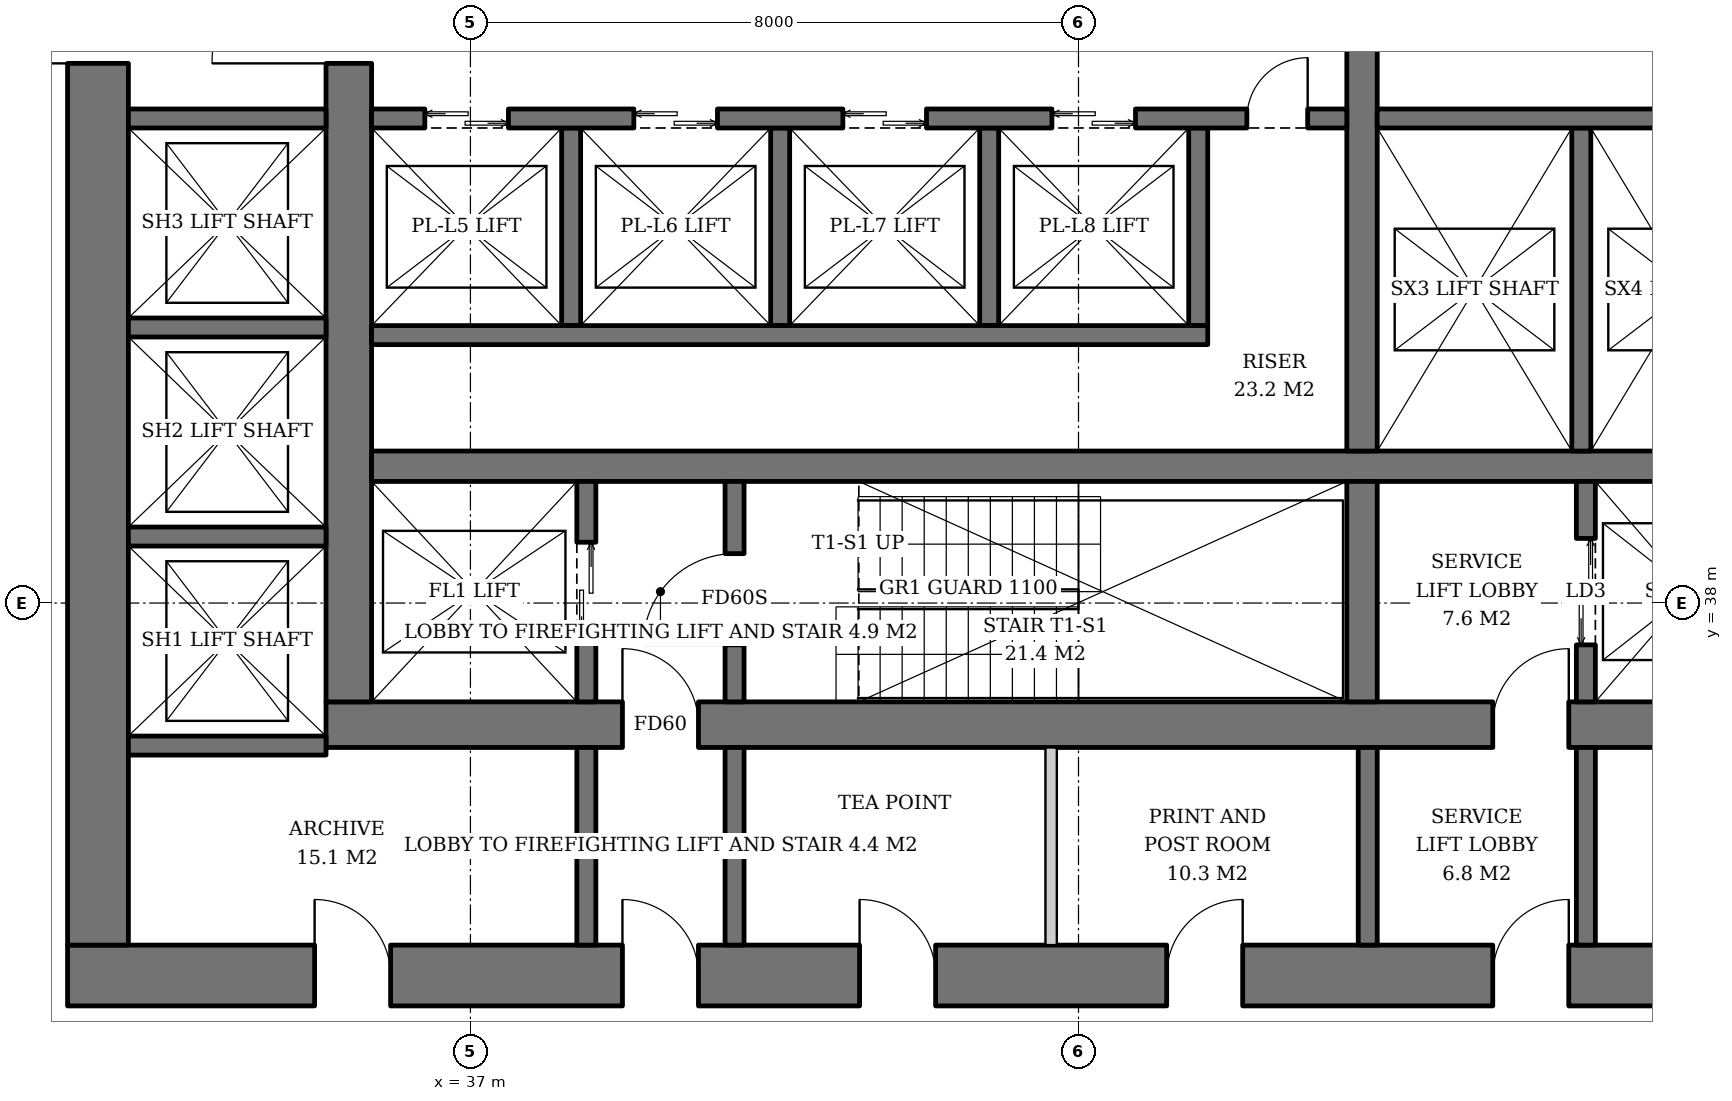
"""IFC4 building model, lengths in metres.
Left out: names, types, materials, properties, quantities, classifications, styles, units other than length and angle.
Written with IfcOpenShell. Run it as: python <this file> out.ifc"""

import sys

from ifc_helpers import new_model, si_unit, direction, frame, frame_2d, origin, place, context, subcontext, project, spatial, rectangle, extrude, element, fill, save


model = new_model("IFC4")
c1 = context("Model", 3, precision=1e-05, world=origin(), true_north=direction((0.0, 1.0)))
c2 = subcontext(c1, "Body", "Model", "MODEL_VIEW")
j1 = project(units=[si_unit("LENGTHUNIT", "METRE"), si_unit("PLANEANGLEUNIT", "RADIAN")], contexts=[c1])
p1 = place(None, origin())
s1 = spatial("IfcSite", under=j1, at=p1, CompositionType="ELEMENT")
p2 = place(p1, origin())
s2 = spatial("IfcBuilding", under=s1, at=p2, CompositionType="ELEMENT")
p3 = place(p2, frame((0.0, 0.0, 36.2)))
s3 = spatial("IfcBuildingStorey", under=s2, at=p3, CompositionType="ELEMENT", Elevation=36.2)
p4 = place(p3, frame((35.1, 36.4, 0.0), z_axis=(0.0, 0.0, 1.0), x_axis=(1.0, 0.0, 0.0)))
e1 = element("IfcWall", 1, at=p4, inside=s3, PredefinedType="SHEAR", context=c2, shape_type="SweptSolid", body=[
    extrude(rectangle(XDim=19.8, YDim=0.6, at=frame_2d((9.9, 0.0))), origin(), (0.0, 0.0, 1.0), 3.8),
])
p5 = place(p4, frame((3.9, 0.0, 0.0)))
e2 = element("IfcOpeningElement", 2, at=p5, cuts=e1, PredefinedType="OPENING", context=c2, shape_type="SweptSolid", body=[
    extrude(rectangle(XDim=1.0, YDim=2.1, at=frame_2d((0.5, 1.05))), frame((0.0, 0.31, 0.0), z_axis=(0.0, -1.0, 0.0), x_axis=(1.0, 0.0, 0.0)), (0.0, 0.0, 1.0), 0.62),
])
p6 = place(p4, frame((15.35, 0.0, 0.0)))
e3 = element("IfcOpeningElement", 3, at=p6, cuts=e1, PredefinedType="OPENING", context=c2, shape_type="SweptSolid", body=[
    extrude(rectangle(XDim=1.0, YDim=2.1, at=frame_2d((0.5, 1.05))), frame((0.0, 0.31, 0.0), z_axis=(0.0, -1.0, 0.0), x_axis=(1.0, 0.0, 0.0)), (0.0, 0.0, 1.0), 0.62),
])
p7 = place(p3, frame((35.4, 36.7, 0.0), z_axis=(0.0, 0.0, 1.0), x_axis=(0.0, 1.0, 0.0)))
e4 = element("IfcWall", 4, at=p7, inside=s3, PredefinedType="SHEAR", context=c2, shape_type="SweptSolid", body=[
    extrude(rectangle(XDim=18.6, YDim=0.6, at=frame_2d((9.3, 0.0))), origin(), (0.0, 0.0, 1.0), 3.8),
])
p8 = place(p7, frame((8.4, 0.0, 0.0)))
e5 = element("IfcOpeningElement", 5, at=p8, cuts=e4, PredefinedType="OPENING", context=c2, shape_type="SweptSolid", body=[
    extrude(rectangle(XDim=1.8, YDim=2.4, at=frame_2d((0.9, 1.2))), frame((0.0, 0.31, 0.0), z_axis=(0.0, -1.0, 0.0), x_axis=(1.0, 0.0, 0.0)), (0.0, 0.0, 1.0), 0.62),
])
p9 = place(p3, frame((31.7, 33.1, 0.0), z_axis=(0.0, 0.0, 1.0), x_axis=(1.0, 0.0, 0.0)))
e6 = element("IfcWall", 6, at=p9, inside=s3, PredefinedType="SHEAR", context=c2, shape_type="SweptSolid", body=[
    extrude(rectangle(XDim=26.6, YDim=0.8, at=frame_2d((13.3, 0.0))), origin(), (0.0, 0.0, 1.0), 3.8),
])
p10 = place(p9, frame((7.3, 0.0, 0.0)))
e7 = element("IfcOpeningElement", 7, at=p10, cuts=e6, PredefinedType="OPENING", context=c2, shape_type="SweptSolid", body=[
    extrude(rectangle(XDim=1.0, YDim=2.1, at=frame_2d((0.5, 1.05))), frame((0.0, 0.41, 0.0), z_axis=(0.0, -1.0, 0.0), x_axis=(1.0, 0.0, 0.0)), (0.0, 0.0, 1.0), 0.82),
])
p11 = place(p9, frame((18.75, 0.0, 0.0)))
e8 = element("IfcOpeningElement", 8, at=p11, cuts=e6, PredefinedType="OPENING", context=c2, shape_type="SweptSolid", body=[
    extrude(rectangle(XDim=1.0, YDim=2.1, at=frame_2d((0.5, 1.05))), frame((0.0, 0.41, 0.0), z_axis=(0.0, -1.0, 0.0), x_axis=(1.0, 0.0, 0.0)), (0.0, 0.0, 1.0), 0.82),
])
p12 = place(p9, frame((3.25, 0.0, 0.0)))
e9 = element("IfcOpeningElement", 9, at=p12, cuts=e6, PredefinedType="OPENING", context=c2, shape_type="SweptSolid", body=[
    extrude(rectangle(XDim=1.0, YDim=2.1, at=frame_2d((0.5, 1.05))), frame((0.0, 0.41, 0.0), z_axis=(0.0, -1.0, 0.0), x_axis=(1.0, 0.0, 0.0)), (0.0, 0.0, 1.0), 0.82),
])
p13 = place(p9, frame((10.42, 0.0, 0.0)))
e10 = element("IfcOpeningElement", 10, at=p13, cuts=e6, PredefinedType="OPENING", context=c2, shape_type="SweptSolid", body=[
    extrude(rectangle(XDim=1.0, YDim=2.1, at=frame_2d((0.5, 1.05))), frame((0.0, 0.41, 0.0), z_axis=(0.0, -1.0, 0.0), x_axis=(1.0, 0.0, 0.0)), (0.0, 0.0, 1.0), 0.82),
])
p14 = place(p9, frame((14.46, 0.0, 0.0)))
e11 = element("IfcOpeningElement", 11, at=p14, cuts=e6, PredefinedType="OPENING", context=c2, shape_type="SweptSolid", body=[
    extrude(rectangle(XDim=1.0, YDim=2.1, at=frame_2d((0.5, 1.05))), frame((0.0, 0.41, 0.0), z_axis=(0.0, -1.0, 0.0), x_axis=(1.0, 0.0, 0.0)), (0.0, 0.0, 1.0), 0.82),
])
p15 = place(p9, frame((22.45, 0.0, 0.0)))
e12 = element("IfcOpeningElement", 12, at=p15, cuts=e6, PredefinedType="OPENING", context=c2, shape_type="SweptSolid", body=[
    extrude(rectangle(XDim=1.0, YDim=2.1, at=frame_2d((0.5, 1.05))), frame((0.0, 0.41, 0.0), z_axis=(0.0, -1.0, 0.0), x_axis=(1.0, 0.0, 0.0)), (0.0, 0.0, 1.0), 0.82),
])
p16 = place(p3, frame((32.1, 33.5, 0.0), z_axis=(0.0, 0.0, 1.0), x_axis=(0.0, 1.0, 0.0)))
e13 = element("IfcWall", 13, at=p16, inside=s3, PredefinedType="SHEAR", context=c2, shape_type="SweptSolid", body=[
    extrude(rectangle(XDim=25.0, YDim=0.8, at=frame_2d((12.5, 0.0))), origin(), (0.0, 0.0, 1.0), 3.8),
])
p17 = place(p16, frame((11.6, 0.0, 0.0)))
e14 = element("IfcOpeningElement", 14, at=p17, cuts=e13, PredefinedType="OPENING", context=c2, shape_type="SweptSolid", body=[
    extrude(rectangle(XDim=1.8, YDim=2.4, at=frame_2d((0.9, 1.2))), frame((0.0, 0.41, 0.0), z_axis=(0.0, -1.0, 0.0), x_axis=(1.0, 0.0, 0.0)), (0.0, 0.0, 1.0), 0.82),
])
p18 = place(p3, frame((35.7, 39.8, 0.0), z_axis=(0.0, 0.0, 1.0), x_axis=(1.0, 0.0, 0.0)))
e15 = element("IfcWall", 15, at=p18, inside=s3, PredefinedType="SHEAR", context=c2, shape_type="SweptSolid", body=[
    extrude(rectangle(XDim=18.6, YDim=0.4, at=frame_2d((9.3, 0.0))), origin(), (0.0, 0.0, 1.0), 3.8),
])
p19 = place(p3, frame((48.73, 36.7, 0.0), z_axis=(0.0, 0.0, 1.0), x_axis=(0.0, 1.0, 0.0)))
e16 = element("IfcWall", 16, at=p19, inside=s3, PredefinedType="SHEAR", context=c2, shape_type="SweptSolid", body=[
    extrude(rectangle(XDim=2.9, YDim=0.4, at=frame_2d((1.45, 0.0))), origin(), (0.0, 0.0, 1.0), 3.8),
])
p20 = place(p3, frame((48.73, 40.0, 0.0), z_axis=(0.0, 0.0, 1.0), x_axis=(0.0, 1.0, 0.0)))
e17 = element("IfcWall", 17, at=p20, inside=s3, PredefinedType="SHEAR", context=c2, shape_type="SweptSolid", body=[
    extrude(rectangle(XDim=12.0, YDim=0.4, at=frame_2d((6.0, 0.0))), origin(), (0.0, 0.0, 1.0), 3.8),
])
p21 = place(p3, frame((38.525, 36.7, 0.0), z_axis=(0.0, 0.0, 1.0), x_axis=(0.0, 1.0, 0.0)))
e18 = element("IfcWall", 18, at=p21, inside=s3, PredefinedType="SHEAR", context=c2, shape_type="SweptSolid", body=[
    extrude(rectangle(XDim=2.9, YDim=0.25, at=frame_2d((1.45, 0.0))), origin(), (0.0, 0.0, 1.0), 3.8),
])
p22 = place(p21, frame((0.8, 0.0, 0.0)))
e19 = element("IfcOpeningElement", 19, at=p22, cuts=e18, PredefinedType="OPENING", context=c2, shape_type="SweptSolid", body=[
    extrude(rectangle(XDim=1.3, YDim=2.2, at=frame_2d((0.65, 1.1))), frame((0.0, 0.135, 0.0), z_axis=(0.0, -1.0, 0.0), x_axis=(1.0, 0.0, 0.0)), (0.0, 0.0, 1.0), 0.27),
])
p23 = place(p3, frame((40.475, 36.7, 0.0), z_axis=(0.0, 0.0, 1.0), x_axis=(0.0, 1.0, 0.0)))
e20 = element("IfcWall", 20, at=p23, inside=s3, PredefinedType="SHEAR", context=c2, shape_type="SweptSolid", body=[
    extrude(rectangle(XDim=2.9, YDim=0.25, at=frame_2d((1.45, 0.0))), origin(), (0.0, 0.0, 1.0), 3.8),
])
p24 = place(p23, frame((0.75, 0.0, 0.0)))
e21 = element("IfcOpeningElement", 21, at=p24, cuts=e20, PredefinedType="OPENING", context=c2, shape_type="SweptSolid", body=[
    extrude(rectangle(XDim=1.2, YDim=2.1, at=frame_2d((0.6, 1.05))), frame((0.0, 0.135, 0.0), z_axis=(0.0, -1.0, 0.0), x_axis=(1.0, 0.0, 0.0)), (0.0, 0.0, 1.0), 0.27),
])
p25 = place(p3, frame((51.675, 36.7, 0.0), z_axis=(0.0, 0.0, 1.0), x_axis=(0.0, 1.0, 0.0)))
e22 = element("IfcWall", 22, at=p25, inside=s3, PredefinedType="SHEAR", context=c2, shape_type="SweptSolid", body=[
    extrude(rectangle(XDim=2.9, YDim=0.25, at=frame_2d((1.45, 0.0))), origin(), (0.0, 0.0, 1.0), 3.8),
])
p26 = place(p25, frame((0.75, 0.0, 0.0)))
e23 = element("IfcOpeningElement", 23, at=p26, cuts=e22, PredefinedType="OPENING", context=c2, shape_type="SweptSolid", body=[
    extrude(rectangle(XDim=1.4, YDim=2.4, at=frame_2d((0.7, 1.2))), frame((0.0, 0.135, 0.0), z_axis=(0.0, -1.0, 0.0), x_axis=(1.0, 0.0, 0.0)), (0.0, 0.0, 1.0), 0.27),
])
for number, where, z_axis, x_axis in (
    (24, (38.325, 44.25, 0.0), (0.0, 0.0, 1.0), (0.0, -1.0, 0.0)),
    (25, (41.075, 44.25, 0.0), (0.0, 0.0, 1.0), (0.0, -1.0, 0.0)),
    (26, (43.825, 44.25, 0.0), (0.0, 0.0, 1.0), (0.0, -1.0, 0.0)),
    (27, (46.575, 44.25, 0.0), (0.0, 0.0, 1.0), (0.0, -1.0, 0.0)),
):
    element("IfcWall", number, at=place(p3, frame(where, z_axis=z_axis, x_axis=x_axis)), inside=s3, PredefinedType="SHEAR", context=c2, shape_type="SweptSolid", body=[
        extrude(rectangle(XDim=2.6, YDim=0.25, at=frame_2d((1.3, 0.0))), origin(), (0.0, 0.0, 1.0), 3.8),
    ])
p27 = place(p3, frame((35.7, 41.525, 0.0), z_axis=(0.0, 0.0, 1.0), x_axis=(1.0, 0.0, 0.0)))
e28 = element("IfcWall", 28, at=p27, inside=s3, PredefinedType="SHEAR", context=c2, shape_type="SweptSolid", body=[
    extrude(rectangle(XDim=11.0, YDim=0.25, at=frame_2d((5.5, 0.0))), origin(), (0.0, 0.0, 1.0), 3.8),
])
p28 = place(p3, frame((35.7, 44.375, 0.0), z_axis=(0.0, 0.0, 1.0), x_axis=(1.0, 0.0, 0.0)))
e29 = element("IfcWall", 29, at=p28, inside=s3, PredefinedType="SHEAR", context=c2, shape_type="SweptSolid", body=[
    extrude(rectangle(XDim=12.83, YDim=0.25, at=frame_2d((6.415, 0.0))), origin(), (0.0, 0.0, 1.0), 3.8),
])
p29 = place(p28, frame((0.7, 0.0, 0.0)))
e30 = element("IfcOpeningElement", 30, at=p29, cuts=e29, PredefinedType="OPENING", context=c2, shape_type="SweptSolid", body=[
    extrude(rectangle(XDim=1.1, YDim=2.2, at=frame_2d((0.55, 1.1))), frame((0.0, 0.135, 0.0), z_axis=(0.0, -1.0, 0.0), x_axis=(1.0, 0.0, 0.0)), (0.0, 0.0, 1.0), 0.27),
])
p30 = place(p28, frame((3.45, 0.0, 0.0)))
e31 = element("IfcOpeningElement", 31, at=p30, cuts=e29, PredefinedType="OPENING", context=c2, shape_type="SweptSolid", body=[
    extrude(rectangle(XDim=1.1, YDim=2.2, at=frame_2d((0.55, 1.1))), frame((0.0, 0.135, 0.0), z_axis=(0.0, -1.0, 0.0), x_axis=(1.0, 0.0, 0.0)), (0.0, 0.0, 1.0), 0.27),
])
p31 = place(p28, frame((6.2, 0.0, 0.0)))
e32 = element("IfcOpeningElement", 32, at=p31, cuts=e29, PredefinedType="OPENING", context=c2, shape_type="SweptSolid", body=[
    extrude(rectangle(XDim=1.1, YDim=2.2, at=frame_2d((0.55, 1.1))), frame((0.0, 0.135, 0.0), z_axis=(0.0, -1.0, 0.0), x_axis=(1.0, 0.0, 0.0)), (0.0, 0.0, 1.0), 0.27),
])
p32 = place(p28, frame((8.95, 0.0, 0.0)))
e33 = element("IfcOpeningElement", 33, at=p32, cuts=e29, PredefinedType="OPENING", context=c2, shape_type="SweptSolid", body=[
    extrude(rectangle(XDim=1.1, YDim=2.2, at=frame_2d((0.55, 1.1))), frame((0.0, 0.135, 0.0), z_axis=(0.0, -1.0, 0.0), x_axis=(1.0, 0.0, 0.0)), (0.0, 0.0, 1.0), 0.27),
])
p33 = place(p28, frame((11.515, 0.0, 0.0)))
e34 = element("IfcOpeningElement", 34, at=p33, cuts=e29, PredefinedType="OPENING", context=c2, shape_type="SweptSolid", body=[
    extrude(rectangle(XDim=0.8, YDim=2.0, at=frame_2d((0.4, 1.0))), frame((0.0, 0.135, 0.0), z_axis=(0.0, -1.0, 0.0), x_axis=(1.0, 0.0, 0.0)), (0.0, 0.0, 1.0), 0.27),
])
p34 = place(p3, frame((51.615, 44.25, 0.0), z_axis=(0.0, 0.0, 1.0), x_axis=(0.0, -1.0, 0.0)))
e35 = element("IfcWall", 35, at=p34, inside=s3, PredefinedType="SHEAR", context=c2, shape_type="SweptSolid", body=[
    extrude(rectangle(XDim=4.25, YDim=0.25, at=frame_2d((2.125, 0.0))), origin(), (0.0, 0.0, 1.0), 3.8),
])
p35 = place(p3, frame((48.93, 44.375, 0.0), z_axis=(0.0, 0.0, 1.0), x_axis=(1.0, 0.0, 0.0)))
e36 = element("IfcWall", 36, at=p35, inside=s3, PredefinedType="SHEAR", context=c2, shape_type="SweptSolid", body=[
    extrude(rectangle(XDim=5.37, YDim=0.25, at=frame_2d((2.685, 0.0))), origin(), (0.0, 0.0, 1.0), 3.8),
])
for number, where, z_axis, x_axis in (
    (37, (32.5, 36.125, 0.0), (0.0, 0.0, 1.0), (1.0, 0.0, 0.0)),
    (38, (32.5, 38.875, 0.0), (0.0, 0.0, 1.0), (1.0, 0.0, 0.0)),
    (39, (32.5, 41.625, 0.0), (0.0, 0.0, 1.0), (1.0, 0.0, 0.0)),
    (40, (32.5, 44.375, 0.0), (0.0, 0.0, 1.0), (1.0, 0.0, 0.0)),
):
    element("IfcWall", number, at=place(p3, frame(where, z_axis=z_axis, x_axis=x_axis)), inside=s3, PredefinedType="SHEAR", context=c2, shape_type="SweptSolid", body=[
        extrude(rectangle(XDim=2.6, YDim=0.25, at=frame_2d((1.3, 0.0))), origin(), (0.0, 0.0, 1.0), 3.8),
    ])
for number, where, z_axis, x_axis in (
    (41, (38.525, 33.5, 0.0), (0.0, 0.0, 1.0), (0.0, 1.0, 0.0)),
    (42, (40.475, 33.5, 0.0), (0.0, 0.0, 1.0), (0.0, 1.0, 0.0)),
    (43, (48.805, 33.5, 0.0), (0.0, 0.0, 1.0), (0.0, 1.0, 0.0)),
    (44, (51.675, 33.5, 0.0), (0.0, 0.0, 1.0), (0.0, 1.0, 0.0)),
):
    element("IfcWall", number, at=place(p3, frame(where, z_axis=z_axis, x_axis=x_axis)), inside=s3, PredefinedType="SOLIDWALL", context=c2, shape_type="SweptSolid", body=[
        extrude(rectangle(XDim=2.6, YDim=0.25, at=frame_2d((1.3, 0.0))), origin(), (0.0, 0.0, 1.0), 3.62),
    ])
p36 = place(p3, frame((44.64, 33.5, 0.0), z_axis=(0.0, 0.0, 1.0), x_axis=(0.0, 1.0, 0.0)))
e45 = element("IfcWall", 45, at=p36, inside=s3, PredefinedType="SOLIDWALL", context=c2, shape_type="SweptSolid", body=[
    extrude(rectangle(XDim=2.6, YDim=0.15, at=frame_2d((1.3, 0.0))), origin(), (0.0, 0.0, 1.0), 3.62),
])
p37 = place(p22, origin())
e46 = element("IfcDoor", 46, at=p37, inside=s3, OperationType="DOUBLE_DOOR_SLIDING", PredefinedType="DOOR", context=c2, shape_type="SweptSolid", body=[
    extrude(rectangle(XDim=1.3, YDim=2.2, at=frame_2d((0.65, 1.1))), frame((0.0, 0.025, 0.0), z_axis=(0.0, -1.0, 0.0), x_axis=(1.0, 0.0, 0.0)), (0.0, 0.0, 1.0), 0.05),
])
fill(e19, e46)
p38 = place(p24, origin())
e47 = element("IfcDoor", 47, at=p38, inside=s3, OperationType="SINGLE_SWING_LEFT", PredefinedType="DOOR", context=c2, shape_type="SweptSolid", body=[
    extrude(rectangle(XDim=1.2, YDim=2.1, at=frame_2d((0.6, 1.05))), frame((0.0, 0.025, 0.0), z_axis=(0.0, -1.0, 0.0), x_axis=(1.0, 0.0, 0.0)), (0.0, 0.0, 1.0), 0.05),
])
fill(e21, e47)
p39 = place(p26, origin())
e48 = element("IfcDoor", 48, at=p39, inside=s3, OperationType="DOUBLE_DOOR_SLIDING", PredefinedType="DOOR", context=c2, shape_type="SweptSolid", body=[
    extrude(rectangle(XDim=1.4, YDim=2.4, at=frame_2d((0.7, 1.2))), frame((0.0, 0.025, 0.0), z_axis=(0.0, -1.0, 0.0), x_axis=(1.0, 0.0, 0.0)), (0.0, 0.0, 1.0), 0.05),
])
fill(e23, e48)
p40 = place(p29, origin())
e49 = element("IfcDoor", 49, at=p40, inside=s3, OperationType="DOUBLE_DOOR_SLIDING", PredefinedType="DOOR", context=c2, shape_type="SweptSolid", body=[
    extrude(rectangle(XDim=1.1, YDim=2.2, at=frame_2d((0.55, 1.1))), frame((0.0, 0.025, 0.0), z_axis=(0.0, -1.0, 0.0), x_axis=(1.0, 0.0, 0.0)), (0.0, 0.0, 1.0), 0.05),
])
fill(e30, e49)
p41 = place(p30, origin())
e50 = element("IfcDoor", 50, at=p41, inside=s3, OperationType="DOUBLE_DOOR_SLIDING", PredefinedType="DOOR", context=c2, shape_type="SweptSolid", body=[
    extrude(rectangle(XDim=1.1, YDim=2.2, at=frame_2d((0.55, 1.1))), frame((0.0, 0.025, 0.0), z_axis=(0.0, -1.0, 0.0), x_axis=(1.0, 0.0, 0.0)), (0.0, 0.0, 1.0), 0.05),
])
fill(e31, e50)
p42 = place(p31, origin())
e51 = element("IfcDoor", 51, at=p42, inside=s3, OperationType="DOUBLE_DOOR_SLIDING", PredefinedType="DOOR", context=c2, shape_type="SweptSolid", body=[
    extrude(rectangle(XDim=1.1, YDim=2.2, at=frame_2d((0.55, 1.1))), frame((0.0, 0.025, 0.0), z_axis=(0.0, -1.0, 0.0), x_axis=(1.0, 0.0, 0.0)), (0.0, 0.0, 1.0), 0.05),
])
fill(e32, e51)
p43 = place(p32, origin())
e52 = element("IfcDoor", 52, at=p43, inside=s3, OperationType="DOUBLE_DOOR_SLIDING", PredefinedType="DOOR", context=c2, shape_type="SweptSolid", body=[
    extrude(rectangle(XDim=1.1, YDim=2.2, at=frame_2d((0.55, 1.1))), frame((0.0, 0.025, 0.0), z_axis=(0.0, -1.0, 0.0), x_axis=(1.0, 0.0, 0.0)), (0.0, 0.0, 1.0), 0.05),
])
fill(e33, e52)
p44 = place(p33, origin())
e53 = element("IfcDoor", 53, at=p44, inside=s3, OperationType="SINGLE_SWING_RIGHT", PredefinedType="DOOR", context=c2, shape_type="SweptSolid", body=[
    extrude(rectangle(XDim=0.8, YDim=2.0, at=frame_2d((0.4, 1.0))), frame((0.0, 0.025, 0.0), z_axis=(0.0, -1.0, 0.0), x_axis=(1.0, 0.0, 0.0)), (0.0, 0.0, 1.0), 0.05),
])
fill(e34, e53)
p45 = place(p5, origin())
e54 = element("IfcDoor", 54, at=p45, inside=s3, OperationType="SINGLE_SWING_LEFT", PredefinedType="DOOR", context=c2, shape_type="SweptSolid", body=[
    extrude(rectangle(XDim=1.0, YDim=2.1, at=frame_2d((0.5, 1.05))), frame((0.0, 0.025, 0.0), z_axis=(0.0, -1.0, 0.0), x_axis=(1.0, 0.0, 0.0)), (0.0, 0.0, 1.0), 0.05),
])
fill(e2, e54)
p46 = place(p8, origin())
e55 = element("IfcDoor", 55, at=p46, inside=s3, OperationType="DOUBLE_DOOR_SINGLE_SWING", PredefinedType="DOOR", context=c2, shape_type="SweptSolid", body=[
    extrude(rectangle(XDim=1.8, YDim=2.4, at=frame_2d((0.9, 1.2))), frame((0.0, 0.025, 0.0), z_axis=(0.0, -1.0, 0.0), x_axis=(1.0, 0.0, 0.0)), (0.0, 0.0, 1.0), 0.05),
])
fill(e5, e55)
p47 = place(p6, origin())
e56 = element("IfcDoor", 56, at=p47, inside=s3, OperationType="SINGLE_SWING_RIGHT", PredefinedType="DOOR", context=c2, shape_type="SweptSolid", body=[
    extrude(rectangle(XDim=1.0, YDim=2.1, at=frame_2d((0.5, 1.05))), frame((0.0, 0.025, 0.0), z_axis=(0.0, -1.0, 0.0), x_axis=(1.0, 0.0, 0.0)), (0.0, 0.0, 1.0), 0.05),
])
fill(e3, e56)
p48 = place(p17, origin())
e57 = element("IfcDoor", 57, at=p48, inside=s3, OperationType="DOUBLE_DOOR_SINGLE_SWING", PredefinedType="DOOR", context=c2, shape_type="SweptSolid", body=[
    extrude(rectangle(XDim=1.8, YDim=2.4, at=frame_2d((0.9, 1.2))), frame((0.0, 0.025, 0.0), z_axis=(0.0, -1.0, 0.0), x_axis=(1.0, 0.0, 0.0)), (0.0, 0.0, 1.0), 0.05),
])
fill(e14, e57)
p49 = place(p10, origin())
e58 = element("IfcDoor", 58, at=p49, inside=s3, OperationType="SINGLE_SWING_LEFT", PredefinedType="DOOR", context=c2, shape_type="SweptSolid", body=[
    extrude(rectangle(XDim=1.0, YDim=2.1, at=frame_2d((0.5, 1.05))), frame((0.0, 0.025, 0.0), z_axis=(0.0, -1.0, 0.0), x_axis=(1.0, 0.0, 0.0)), (0.0, 0.0, 1.0), 0.05),
])
fill(e7, e58)
p50 = place(p11, origin())
e59 = element("IfcDoor", 59, at=p50, inside=s3, OperationType="SINGLE_SWING_RIGHT", PredefinedType="DOOR", context=c2, shape_type="SweptSolid", body=[
    extrude(rectangle(XDim=1.0, YDim=2.1, at=frame_2d((0.5, 1.05))), frame((0.0, 0.025, 0.0), z_axis=(0.0, -1.0, 0.0), x_axis=(1.0, 0.0, 0.0)), (0.0, 0.0, 1.0), 0.05),
])
fill(e8, e59)
p51 = place(p12, origin())
e60 = element("IfcDoor", 60, at=p51, inside=s3, OperationType="SINGLE_SWING_LEFT", PredefinedType="DOOR", context=c2, shape_type="SweptSolid", body=[
    extrude(rectangle(XDim=1.0, YDim=2.1, at=frame_2d((0.5, 1.05))), frame((0.0, 0.39, 0.0), z_axis=(0.0, -1.0, 0.0), x_axis=(1.0, 0.0, 0.0)), (0.0, 0.0, 1.0), 0.05),
])
fill(e9, e60)
p52 = place(p13, origin())
e61 = element("IfcDoor", 61, at=p52, inside=s3, OperationType="SINGLE_SWING_LEFT", PredefinedType="DOOR", context=c2, shape_type="SweptSolid", body=[
    extrude(rectangle(XDim=1.0, YDim=2.1, at=frame_2d((0.5, 1.05))), frame((0.0, 0.39, 0.0), z_axis=(0.0, -1.0, 0.0), x_axis=(1.0, 0.0, 0.0)), (0.0, 0.0, 1.0), 0.05),
])
fill(e10, e61)
p53 = place(p14, origin())
e62 = element("IfcDoor", 62, at=p53, inside=s3, OperationType="SINGLE_SWING_RIGHT", PredefinedType="DOOR", context=c2, shape_type="SweptSolid", body=[
    extrude(rectangle(XDim=1.0, YDim=2.1, at=frame_2d((0.5, 1.05))), frame((0.0, 0.39, 0.0), z_axis=(0.0, -1.0, 0.0), x_axis=(1.0, 0.0, 0.0)), (0.0, 0.0, 1.0), 0.05),
])
fill(e11, e62)
save(model, sys.argv[1])
